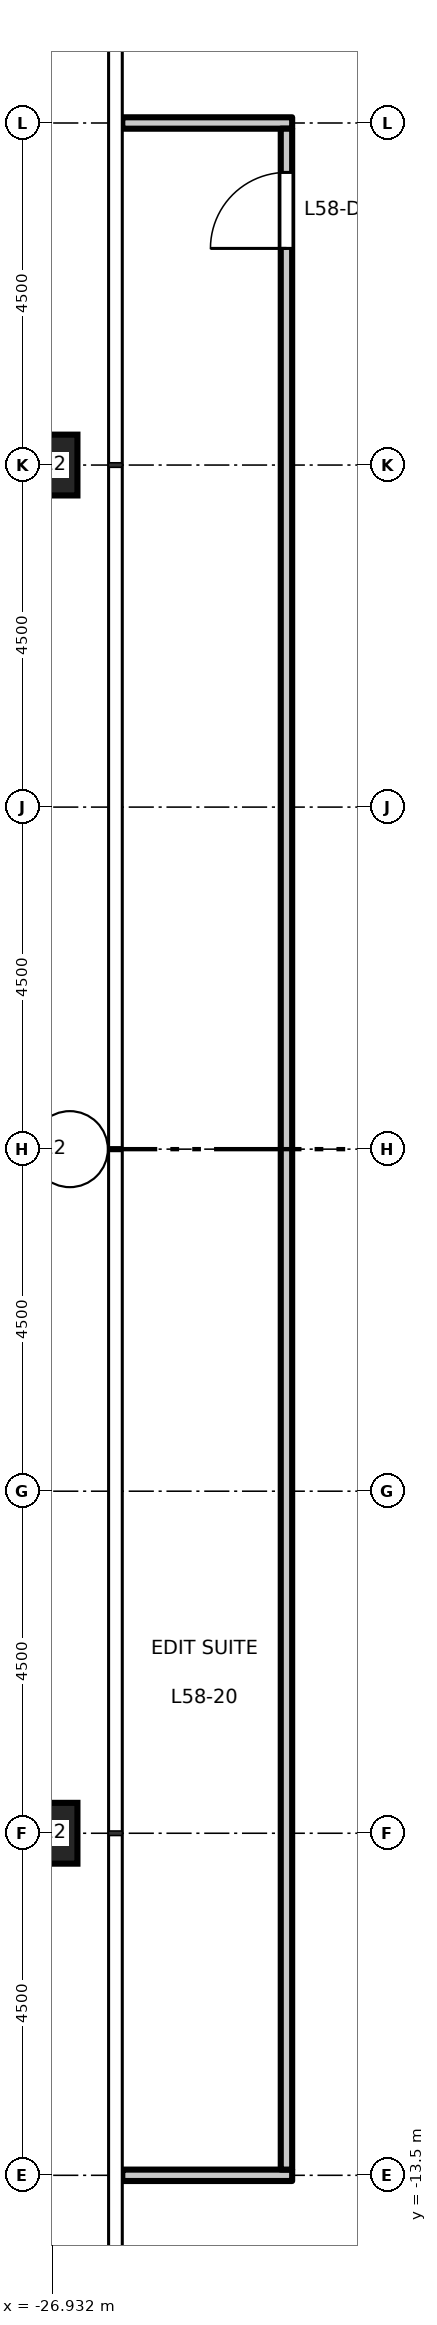
"""IFC4 building model, lengths in metres.
Left out: names, types, materials, properties, quantities, classifications, styles, units other than length and angle.
Written with IfcOpenShell. Run it as: python <this file> out.ifc"""

import sys

from ifc_helpers import new_model, si_unit, direction, frame, frame_2d, origin, origin_2d, place, context, subcontext, project, spatial, rectangle, hollow_rectangle, extrude, element, fill, save


model = new_model("IFC4")
c1 = context("Model", 3, precision=1e-05, world=origin(), true_north=direction((0.0, 1.0)))
c2 = subcontext(c1, "Body", "Model", "MODEL_VIEW")
j1 = project(units=[si_unit("LENGTHUNIT", "METRE"), si_unit("PLANEANGLEUNIT", "RADIAN")], contexts=[c1])
p1 = place(None, origin())
s1 = spatial("IfcSite", under=j1, at=p1, CompositionType="ELEMENT")
p2 = place(p1, origin())
s2 = spatial("IfcBuilding", under=s1, at=p2, CompositionType="ELEMENT")
p3 = place(p2, frame((0.0, 0.0, 269.2)))
s3 = spatial("IfcBuildingStorey", under=s2, at=p3, CompositionType="ELEMENT", Elevation=269.2)
for number, where, z_axis, x_axis in (
    (1, (-27.0, 9.0, 0.0), (0.0, 0.0, 1.0), (1.0, 0.0, 0.0)),
    (2, (-27.0, 0.0, 0.0), (0.0, 0.0, 1.0), (1.0, 0.0, 0.0)),
    (3, (-27.0, -9.0, 0.0), (0.0, 0.0, 1.0), (1.0, 0.0, 0.0)),
):
    element("IfcColumn", number, at=place(p3, frame(where, z_axis=z_axis, x_axis=x_axis)), inside=s3, PredefinedType="COLUMN", context=c2, shape_type="SweptSolid", body=[
        extrude(hollow_rectangle(XDim=0.8, YDim=0.8, WallThickness=0.045, at=origin_2d()), origin(), (0.0, 0.0, 1.0), 4.5),
    ])
p4 = place(p3, frame((-26.01, -13.5, 0.0), z_axis=(0.0, 0.0, 1.0), x_axis=(1.0, 0.0, 0.0)))
e4 = element("IfcWall", 4, at=p4, inside=s3, PredefinedType="PARTITIONING", context=c2, shape_type="SweptSolid", body=[
    extrude(rectangle(XDim=2.235, YDim=0.15, at=frame_2d((1.118, 0.0))), origin(), (0.0, 0.0, 1.0), 3.95),
])
p5 = place(p3, frame((-26.01, 13.5, 0.0), z_axis=(0.0, 0.0, 1.0), x_axis=(1.0, 0.0, 0.0)))
e5 = element("IfcWall", 5, at=p5, inside=s3, PredefinedType="PARTITIONING", context=c2, shape_type="SweptSolid", body=[
    extrude(rectangle(XDim=2.235, YDim=0.15, at=frame_2d((1.118, 0.0))), origin(), (0.0, 0.0, 1.0), 4.35),
])
p6 = place(p3, frame((-23.85, -13.425, 0.0), z_axis=(0.0, 0.0, 1.0), x_axis=(0.0, 1.0, 0.0)))
e6 = element("IfcWall", 6, at=p6, inside=s3, PredefinedType="PARTITIONING", context=c2, shape_type="SweptSolid", body=[
    extrude(rectangle(XDim=26.85, YDim=0.15, at=frame_2d((13.425, 0.0))), origin(), (0.0, 0.0, 1.0), 4.35),
])
p7 = place(p6, frame((25.275, 0.0, 0.0)))
e7 = element("IfcOpeningElement", 7, at=p7, cuts=e6, PredefinedType="OPENING", context=c2, shape_type="SweptSolid", body=[
    extrude(rectangle(XDim=1.0, YDim=2.1, at=frame_2d((0.5, 1.05))), frame((0.0, 0.085, 0.0), z_axis=(0.0, -1.0, 0.0), x_axis=(1.0, 0.0, 0.0)), (0.0, 0.0, 1.0), 0.17),
])
p8 = place(p7, origin())
e8 = element("IfcDoor", 8, at=p8, inside=s3, OperationType="SINGLE_SWING_LEFT", PredefinedType="DOOR", context=c2, shape_type="SweptSolid", body=[
    extrude(rectangle(XDim=1.0, YDim=2.1, at=frame_2d((0.5, 1.05))), frame((0.0, 0.025, 0.0), z_axis=(0.0, -1.0, 0.0), x_axis=(1.0, 0.0, 0.0)), (0.0, 0.0, 1.0), 0.05),
])
fill(e7, e8)
save(model, sys.argv[1])
